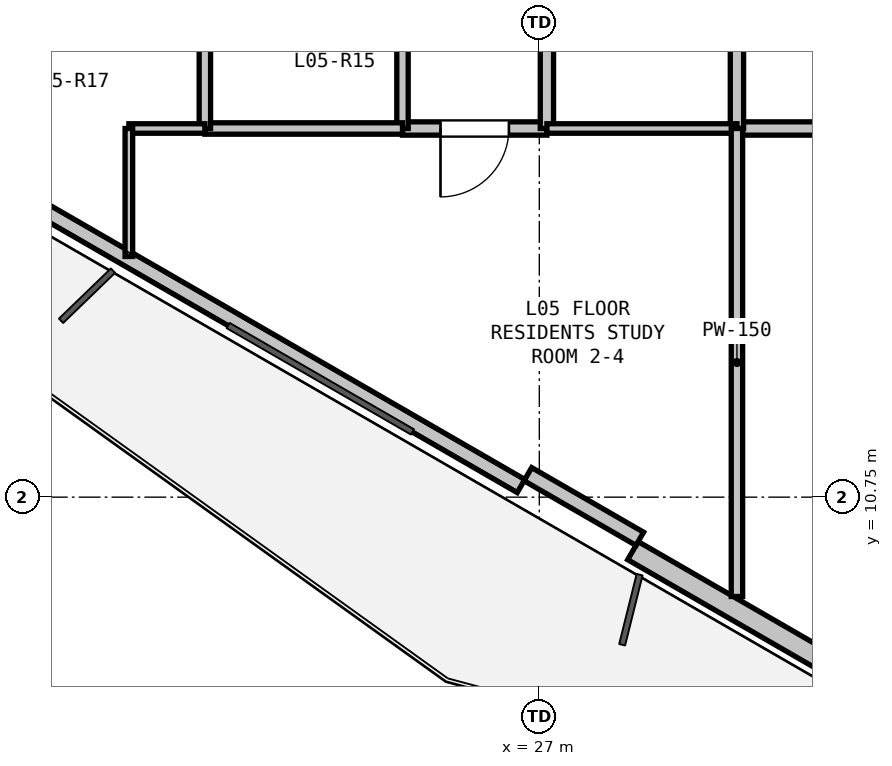
"""IFC4 building model, lengths in metres.
Left out: names, types, materials, properties, quantities, classifications, styles, units other than length and angle.
Written with IfcOpenShell. Run it as: python <this file> out.ifc"""

import sys

from ifc_helpers import new_model, si_unit, direction, frame, frame_2d, origin, place, context, subcontext, project, spatial, rectangle, extrude, element, fill, save


model = new_model("IFC4")
c1 = context("Model", 3, precision=1e-05, world=origin(), true_north=direction((0.0, 1.0)))
c2 = subcontext(c1, "Body", "Model", "MODEL_VIEW")
j1 = project(units=[si_unit("LENGTHUNIT", "METRE"), si_unit("PLANEANGLEUNIT", "RADIAN")], contexts=[c1])
p1 = place(None, origin())
s1 = spatial("IfcSite", under=j1, at=p1, CompositionType="ELEMENT")
p2 = place(p1, origin())
s2 = spatial("IfcBuilding", under=s1, at=p2, CompositionType="ELEMENT")
p3 = place(p2, frame((0.0, 0.0, 22.5)))
s3 = spatial("IfcBuildingStorey", under=s2, at=p3, CompositionType="ELEMENT", Elevation=22.5)
p4 = place(p3, frame((39.207, 3.71, 0.0), z_axis=(0.0, 0.0, 1.0), x_axis=(-0.86603192154, 0.499988710747, 0.0)))
e1 = element("IfcWall", 1, at=p4, inside=s3, PredefinedType="SOLIDWALL", context=c2, shape_type="SweptSolid", body=[
    extrude(rectangle(XDim=12.673, YDim=0.275, at=frame_2d((6.336, 0.0))), origin(), (0.0, 0.0, 1.0), 2.66),
])
p5 = place(p4, frame((8.136, 0.0, 0.0)))
e2 = element("IfcOpeningElement", 2, at=p5, cuts=e1, PredefinedType="OPENING", context=c2, shape_type="SweptSolid", body=[
    extrude(rectangle(XDim=1.0, YDim=2.1, at=frame_2d((0.5, 1.05))), frame((0.0, 0.147, 0.0), z_axis=(0.0, -1.0, 0.0), x_axis=(1.0, 0.0, 0.0)), (0.0, 0.0, 1.0), 0.295),
])
p6 = place(p4, frame((2.216, 0.0, 0.9)))
e3 = element("IfcOpeningElement", 3, at=p6, cuts=e1, PredefinedType="OPENING", context=c2, shape_type="SweptSolid", body=[
    extrude(rectangle(XDim=1.2, YDim=1.4, at=frame_2d((0.6, 0.7))), frame((0.0, 0.147, 0.0), z_axis=(0.0, -1.0, 0.0), x_axis=(1.0, 0.0, 0.0)), (0.0, 0.0, 1.0), 0.295),
])
p7 = place(p3, frame((26.76, 10.896, 0.0), z_axis=(0.0, 0.0, 1.0), x_axis=(-0.866027351828, 0.499996625875, 0.0)))
e4 = element("IfcWall", 4, at=p7, inside=s3, PredefinedType="PARAPET", context=c2, shape_type="SweptSolid", body=[
    extrude(rectangle(XDim=11.973, YDim=0.2, at=frame_2d((5.987, 0.0))), origin(), (0.0, 0.0, 1.0), 0.2),
])
p8 = place(p3, frame((28.322, 10.202, 0.0), z_axis=(0.0, 0.0, 1.0), x_axis=(-0.86605165483, 0.499954529098, 0.0)))
e5 = element("IfcWall", 5, at=p8, inside=s3, PredefinedType="PARAPET", context=c2, shape_type="SweptSolid", body=[
    extrude(rectangle(XDim=1.7, YDim=0.2, at=frame_2d((0.85, 0.0))), origin(), (0.0, 0.0, 1.0), 2.66),
])
p9 = place(p3, frame((27.1, 15.6, 0.0), z_axis=(0.0, 0.0, 1.0), x_axis=(-1.0, 0.0, 0.0)))
e6 = element("IfcWall", 6, at=p9, inside=s3, PredefinedType="PLUMBINGWALL", context=c2, shape_type="SweptSolid", body=[
    extrude(rectangle(XDim=1.9, YDim=0.175, at=frame_2d((0.95, 0.0))), origin(), (0.0, 0.0, 1.0), 2.337),
])
p10 = place(p9, frame((0.5, 0.0, 0.0)))
e7 = element("IfcOpeningElement", 7, at=p10, cuts=e6, PredefinedType="OPENING", context=c2, shape_type="SweptSolid", body=[
    extrude(rectangle(XDim=0.9, YDim=2.1, at=frame_2d((0.45, 1.05))), frame((0.0, 0.097, 0.0), z_axis=(0.0, -1.0, 0.0), x_axis=(1.0, 0.0, 0.0)), (0.0, 0.0, 1.0), 0.195),
])
p11 = place(p3, frame((25.2, 15.6, 0.0), z_axis=(0.0, 0.0, 1.0), x_axis=(0.0, 1.0, 0.0)))
e8 = element("IfcWall", 8, at=p11, inside=s3, PredefinedType="PARTITIONING", context=c2, shape_type="SweptSolid", body=[
    extrude(rectangle(XDim=2.55, YDim=0.15, at=frame_2d((1.275, 0.0))), origin(), (0.0, 0.0, 1.0), 2.337),
])
p12 = place(p3, frame((27.1, 18.15, 0.0), z_axis=(0.0, 0.0, 1.0), x_axis=(0.0, -1.0, 0.0)))
e9 = element("IfcWall", 9, at=p12, inside=s3, PredefinedType="PLUMBINGWALL", context=c2, shape_type="SweptSolid", body=[
    extrude(rectangle(XDim=2.55, YDim=0.175, at=frame_2d((1.275, 0.0))), origin(), (0.0, 0.0, 1.0), 3.04),
])
p13 = place(p3, frame((31.6, 15.6, 0.0), z_axis=(0.0, 0.0, 1.0), x_axis=(-1.0, 0.0, 0.0)))
e10 = element("IfcWall", 10, at=p13, inside=s3, PredefinedType="PLUMBINGWALL", context=c2, shape_type="SweptSolid", body=[
    extrude(rectangle(XDim=2.0, YDim=0.175, at=frame_2d((1.0, 0.0))), origin(), (0.0, 0.0, 1.0), 3.04),
])
p14 = place(p3, frame((29.6, 15.6, 0.0), z_axis=(0.0, 0.0, 1.0), x_axis=(0.0, 1.0, 0.0)))
e11 = element("IfcWall", 11, at=p14, inside=s3, PredefinedType="PLUMBINGWALL", context=c2, shape_type="SweptSolid", body=[
    extrude(rectangle(XDim=2.55, YDim=0.175, at=frame_2d((1.275, 0.0))), origin(), (0.0, 0.0, 1.0), 3.04),
])
p15 = place(p3, frame((25.2, 15.6, 0.0), z_axis=(0.0, 0.0, 1.0), x_axis=(-1.0, 0.0, 0.0)))
e12 = element("IfcWall", 12, at=p15, inside=s3, PredefinedType="PARTITIONING", context=c2, shape_type="SweptSolid", body=[
    extrude(rectangle(XDim=2.6, YDim=0.15, at=frame_2d((1.3, 0.0))), origin(), (0.0, 0.0, 1.0), 3.04),
])
p16 = place(p3, frame((22.6, 15.6, 0.0), z_axis=(0.0, 0.0, 1.0), x_axis=(0.0, 1.0, 0.0)))
e13 = element("IfcWall", 13, at=p16, inside=s3, PredefinedType="PARTITIONING", context=c2, shape_type="SweptSolid", body=[
    extrude(rectangle(XDim=2.55, YDim=0.15, at=frame_2d((1.275, 0.0))), origin(), (0.0, 0.0, 1.0), 3.04),
])
p17 = place(p3, frame((22.6, 15.6, 0.0), z_axis=(0.0, 0.0, 1.0), x_axis=(-1.0, 0.0, 0.0)))
e14 = element("IfcWall", 14, at=p17, inside=s3, PredefinedType="PARTITIONING", context=c2, shape_type="SweptSolid", body=[
    extrude(rectangle(XDim=1.0, YDim=0.125, at=frame_2d((0.5, 0.0))), origin(), (0.0, 0.0, 1.0), 3.04),
])
p18 = place(p3, frame((21.6, 15.6, 0.0), z_axis=(0.0, 0.0, 1.0), x_axis=(0.0, -1.0, 0.0)))
e15 = element("IfcWall", 15, at=p18, inside=s3, PredefinedType="PARTITIONING", context=c2, shape_type="SweptSolid", body=[
    extrude(rectangle(XDim=1.684, YDim=0.1, at=frame_2d((0.842, 0.0))), origin(), (0.0, 0.0, 1.0), 2.365),
])
p19 = place(p3, frame((27.1, 15.6, 0.0), z_axis=(0.0, 0.0, 1.0), x_axis=(1.0, 0.0, 0.0)))
e16 = element("IfcWall", 16, at=p19, inside=s3, PredefinedType="PARTITIONING", context=c2, shape_type="SweptSolid", body=[
    extrude(rectangle(XDim=2.5, YDim=0.125, at=frame_2d((1.25, 0.0))), origin(), (0.0, 0.0, 1.0), 3.04),
])
p20 = place(p3, frame((29.6, 15.6, 0.0), z_axis=(0.0, 0.0, 1.0), x_axis=(0.0, -1.0, 0.0)))
e17 = element("IfcWall", 17, at=p20, inside=s3, PredefinedType="PARTITIONING", context=c2, shape_type="SweptSolid", body=[
    extrude(rectangle(XDim=6.157, YDim=0.15, at=frame_2d((3.079, 0.0))), origin(), (0.0, 0.0, 1.0), 2.337),
])
p21 = place(p10, origin())
e18 = element("IfcDoor", 18, at=p21, inside=s3, OperationType="SINGLE_SWING_RIGHT", PredefinedType="DOOR", context=c2, shape_type="SweptSolid", body=[
    extrude(rectangle(XDim=0.9, YDim=2.1, at=frame_2d((0.45, 1.05))), frame((0.0, 0.025, 0.0), z_axis=(0.0, -1.0, 0.0), x_axis=(1.0, 0.0, 0.0)), (0.0, 0.0, 1.0), 0.05),
])
fill(e7, e18)
save(model, sys.argv[1])
